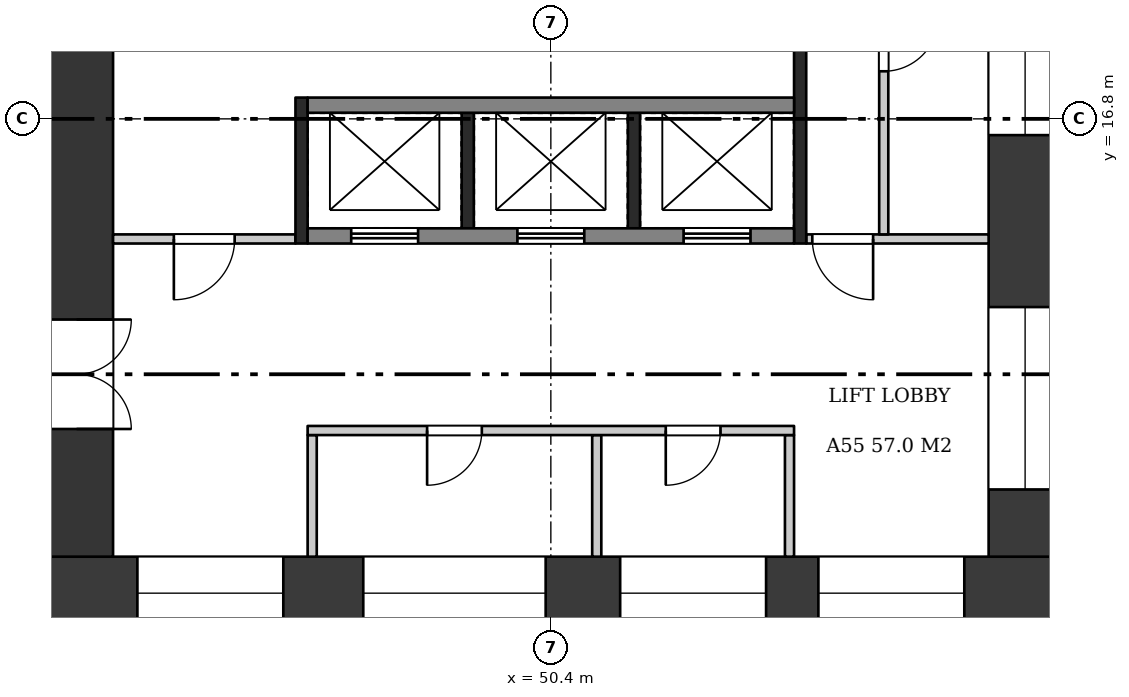
"""IFC4 building model, lengths in metres.
Left out: names, types, materials, properties, quantities, classifications, styles, units other than length and angle.
Written with IfcOpenShell. Run it as: python <this file> out.ifc"""

import sys

from ifc_helpers import new_model, si_unit, direction, frame, frame_2d, origin, place, context, subcontext, project, spatial, rectangle, extrude, element, fill, save


model = new_model("IFC4")
c1 = context("Model", 3, precision=1e-05, world=origin(), true_north=direction((0.0, 1.0)))
c2 = subcontext(c1, "Body", "Model", "MODEL_VIEW")
j1 = project(units=[si_unit("LENGTHUNIT", "METRE"), si_unit("PLANEANGLEUNIT", "RADIAN")], contexts=[c1])
p1 = place(None, origin())
s1 = spatial("IfcSite", under=j1, at=p1, CompositionType="ELEMENT")
p2 = place(p1, origin())
s2 = spatial("IfcBuilding", under=s1, at=p2, CompositionType="ELEMENT")
p3 = place(p2, frame((0.0, 0.0, 214.2)))
s3 = spatial("IfcBuildingStorey", under=s2, at=p3, CompositionType="ELEMENT", Elevation=214.2)
p4 = place(p3, frame((42.0, 9.0, 0.0), z_axis=(0.0, 0.0, 1.0), x_axis=(1.0, 0.0, 0.0)))
e1 = element("IfcWall", 1, at=p4, inside=s3, PredefinedType="SHEAR", context=c2, shape_type="SweptSolid", body=[
    extrude(rectangle(XDim=16.8, YDim=1.2, at=frame_2d((8.4, 0.0))), origin(), (0.0, 0.0, 1.0), 3.22),
])
p5 = place(p4, frame((1.6, 0.0, 0.6)))
e2 = element("IfcOpeningElement", 2, at=p5, cuts=e1, PredefinedType="OPENING", context=c2, shape_type="SweptSolid", body=[
    extrude(rectangle(XDim=2.4, YDim=2.1, at=frame_2d((1.2, 1.05))), frame((0.0, 0.61, 0.0), z_axis=(0.0, -1.0, 0.0), x_axis=(1.0, 0.0, 0.0)), (0.0, 0.0, 1.0), 1.22),
])
p6 = place(p4, frame((5.315, 0.0, 1.6)))
e3 = element("IfcOpeningElement", 3, at=p6, cuts=e1, PredefinedType="OPENING", context=c2, shape_type="SweptSolid", body=[
    extrude(rectangle(XDim=3.0, YDim=1.2, at=frame_2d((1.5, 0.6))), frame((0.0, 0.61, 0.0), z_axis=(0.0, -1.0, 0.0), x_axis=(1.0, 0.0, 0.0)), (0.0, 0.0, 1.0), 1.22),
])
p7 = place(p4, frame((9.54, 0.0, 1.6)))
e4 = element("IfcOpeningElement", 4, at=p7, cuts=e1, PredefinedType="OPENING", context=c2, shape_type="SweptSolid", body=[
    extrude(rectangle(XDim=2.4, YDim=1.2, at=frame_2d((1.2, 0.6))), frame((0.0, 0.61, 0.0), z_axis=(0.0, -1.0, 0.0), x_axis=(1.0, 0.0, 0.0)), (0.0, 0.0, 1.0), 1.22),
])
p8 = place(p4, frame((12.8, 0.0, 0.6)))
e5 = element("IfcOpeningElement", 5, at=p8, cuts=e1, PredefinedType="OPENING", context=c2, shape_type="SweptSolid", body=[
    extrude(rectangle(XDim=2.4, YDim=2.1, at=frame_2d((1.2, 1.05))), frame((0.0, 0.61, 0.0), z_axis=(0.0, -1.0, 0.0), x_axis=(1.0, 0.0, 0.0)), (0.0, 0.0, 1.0), 1.22),
])
p9 = place(p3, frame((42.6, 9.6, 0.0), z_axis=(0.0, 0.0, 1.0), x_axis=(0.0, 1.0, 0.0)))
e6 = element("IfcWall", 6, at=p9, inside=s3, PredefinedType="SHEAR", context=c2, shape_type="SweptSolid", body=[
    extrude(rectangle(XDim=14.4, YDim=1.2, at=frame_2d((7.2, 0.0))), origin(), (0.0, 0.0, 1.0), 3.22),
])
p10 = place(p9, frame((2.1, 0.0, 0.0)))
e7 = element("IfcOpeningElement", 7, at=p10, cuts=e6, PredefinedType="OPENING", context=c2, shape_type="SweptSolid", body=[
    extrude(rectangle(XDim=1.8, YDim=2.1, at=frame_2d((0.9, 1.05))), frame((0.0, 0.61, 0.0), z_axis=(0.0, -1.0, 0.0), x_axis=(1.0, 0.0, 0.0)), (0.0, 0.0, 1.0), 1.22),
])
p11 = place(p3, frame((58.2, 9.6, 0.0), z_axis=(0.0, 0.0, 1.0), x_axis=(0.0, 1.0, 0.0)))
e8 = element("IfcWall", 8, at=p11, inside=s3, PredefinedType="SHEAR", context=c2, shape_type="SweptSolid", body=[
    extrude(rectangle(XDim=14.4, YDim=1.2, at=frame_2d((7.2, 0.0))), origin(), (0.0, 0.0, 1.0), 3.22),
])
p12 = place(p11, frame((1.105, 0.0, 0.6)))
e9 = element("IfcOpeningElement", 9, at=p12, cuts=e8, PredefinedType="OPENING", context=c2, shape_type="SweptSolid", body=[
    extrude(rectangle(XDim=3.0, YDim=2.1, at=frame_2d((1.5, 1.05))), frame((0.0, 0.61, 0.0), z_axis=(0.0, -1.0, 0.0), x_axis=(1.0, 0.0, 0.0)), (0.0, 0.0, 1.0), 1.22),
])
p13 = place(p11, frame((6.933, 0.0, 1.6)))
e10 = element("IfcOpeningElement", 10, at=p13, cuts=e8, PredefinedType="OPENING", context=c2, shape_type="SweptSolid", body=[
    extrude(rectangle(XDim=3.0, YDim=1.2, at=frame_2d((1.5, 0.6))), frame((0.0, 0.61, 0.0), z_axis=(0.0, -1.0, 0.0), x_axis=(1.0, 0.0, 0.0)), (0.0, 0.0, 1.0), 1.22),
])
p14 = place(p11, frame((12.127, 0.0, 1.6)))
e11 = element("IfcOpeningElement", 11, at=p14, cuts=e8, PredefinedType="OPENING", context=c2, shape_type="SweptSolid", body=[
    extrude(rectangle(XDim=1.8, YDim=1.2, at=frame_2d((0.9, 0.6))), frame((0.0, 0.61, 0.0), z_axis=(0.0, -1.0, 0.0), x_axis=(1.0, 0.0, 0.0)), (0.0, 0.0, 1.0), 1.22),
])
for number, where, z_axis, x_axis in (
    (12, (46.475, 9.6, 0.0), (0.0, 0.0, 1.0), (0.0, 1.0, 0.0)),
    (13, (54.325, 9.6, 0.0), (0.0, 0.0, 1.0), (0.0, 1.0, 0.0)),
    (14, (51.155, 9.6, 0.0), (0.0, 0.0, 1.0), (0.0, 1.0, 0.0)),
):
    element("IfcWall", number, at=place(p3, frame(where, z_axis=z_axis, x_axis=x_axis)), inside=s3, PredefinedType="PARTITIONING", context=c2, shape_type="SweptSolid", body=[
        extrude(rectangle(XDim=2.0, YDim=0.15, at=frame_2d((1.0, 0.0))), origin(), (0.0, 0.0, 1.0), 3.22),
    ])
p15 = place(p3, frame((46.4, 11.675, 0.0), z_axis=(0.0, 0.0, 1.0), x_axis=(1.0, 0.0, 0.0)))
e15 = element("IfcWall", 15, at=p15, inside=s3, PredefinedType="PARTITIONING", context=c2, shape_type="SweptSolid", body=[
    extrude(rectangle(XDim=8.0, YDim=0.15, at=frame_2d((4.0, 0.0))), origin(), (0.0, 0.0, 1.0), 3.22),
])
p16 = place(p15, frame((1.965, 0.0, 0.0)))
e16 = element("IfcOpeningElement", 16, at=p16, cuts=e15, PredefinedType="OPENING", context=c2, shape_type="SweptSolid", body=[
    extrude(rectangle(XDim=0.9, YDim=2.1, at=frame_2d((0.45, 1.05))), frame((0.0, 0.085, 0.0), z_axis=(0.0, -1.0, 0.0), x_axis=(1.0, 0.0, 0.0)), (0.0, 0.0, 1.0), 0.17),
])
p17 = place(p15, frame((5.89, 0.0, 0.0)))
e17 = element("IfcOpeningElement", 17, at=p17, cuts=e15, PredefinedType="OPENING", context=c2, shape_type="SweptSolid", body=[
    extrude(rectangle(XDim=0.9, YDim=2.1, at=frame_2d((0.45, 1.05))), frame((0.0, 0.085, 0.0), z_axis=(0.0, -1.0, 0.0), x_axis=(1.0, 0.0, 0.0)), (0.0, 0.0, 1.0), 0.17),
])
for number, where, z_axis, x_axis in (
    (18, (49.033, 15.0, 0.0), (0.0, 0.0, 1.0), (0.0, 1.0, 0.0)),
    (19, (51.767, 15.0, 0.0), (0.0, 0.0, 1.0), (0.0, 1.0, 0.0)),
):
    element("IfcWall", number, at=place(p3, frame(where, z_axis=z_axis, x_axis=x_axis)), inside=s3, PredefinedType="SHEAR", context=c2, shape_type="SweptSolid", body=[
        extrude(rectangle(XDim=1.9, YDim=0.2, at=frame_2d((0.95, 0.0))), origin(), (0.0, 0.0, 1.0), 3.22),
    ])
p18 = place(p3, frame((46.4, 14.875, 0.0), z_axis=(0.0, 0.0, 1.0), x_axis=(1.0, 0.0, 0.0)))
e20 = element("IfcWall", 20, at=p18, inside=s3, PredefinedType="SHEAR", context=c2, shape_type="SweptSolid", body=[
    extrude(rectangle(XDim=8.0, YDim=0.25, at=frame_2d((4.0, 0.0))), origin(), (0.0, 0.0, 1.0), 3.22),
])
p19 = place(p18, frame((0.717, 0.0, 0.0)))
e21 = element("IfcOpeningElement", 21, at=p19, cuts=e20, PredefinedType="OPENING", context=c2, shape_type="SweptSolid", body=[
    extrude(rectangle(XDim=1.1, YDim=2.1, at=frame_2d((0.55, 1.05))), frame((0.0, 0.135, 0.0), z_axis=(0.0, -1.0, 0.0), x_axis=(1.0, 0.0, 0.0)), (0.0, 0.0, 1.0), 0.27),
])
p20 = place(p18, frame((3.45, 0.0, 0.0)))
e22 = element("IfcOpeningElement", 22, at=p20, cuts=e20, PredefinedType="OPENING", context=c2, shape_type="SweptSolid", body=[
    extrude(rectangle(XDim=1.1, YDim=2.1, at=frame_2d((0.55, 1.05))), frame((0.0, 0.135, 0.0), z_axis=(0.0, -1.0, 0.0), x_axis=(1.0, 0.0, 0.0)), (0.0, 0.0, 1.0), 0.27),
])
p21 = place(p18, frame((6.183, 0.0, 0.0)))
e23 = element("IfcOpeningElement", 23, at=p21, cuts=e20, PredefinedType="OPENING", context=c2, shape_type="SweptSolid", body=[
    extrude(rectangle(XDim=1.1, YDim=2.1, at=frame_2d((0.55, 1.05))), frame((0.0, 0.135, 0.0), z_axis=(0.0, -1.0, 0.0), x_axis=(1.0, 0.0, 0.0)), (0.0, 0.0, 1.0), 0.27),
])
p22 = place(p3, frame((46.4, 17.025, 0.0), z_axis=(0.0, 0.0, 1.0), x_axis=(1.0, 0.0, 0.0)))
e24 = element("IfcWall", 24, at=p22, inside=s3, PredefinedType="SHEAR", context=c2, shape_type="SweptSolid", body=[
    extrude(rectangle(XDim=8.0, YDim=0.25, at=frame_2d((4.0, 0.0))), origin(), (0.0, 0.0, 1.0), 3.22),
])
p23 = place(p3, frame((46.3, 14.75, 0.0), z_axis=(0.0, 0.0, 1.0), x_axis=(0.0, 1.0, 0.0)))
e25 = element("IfcWall", 25, at=p23, inside=s3, PredefinedType="SHEAR", context=c2, shape_type="SweptSolid", body=[
    extrude(rectangle(XDim=2.4, YDim=0.2, at=frame_2d((1.2, 0.0))), origin(), (0.0, 0.0, 1.0), 3.22),
])
p24 = place(p3, frame((43.2, 14.825, 0.0), z_axis=(0.0, 0.0, 1.0), x_axis=(1.0, 0.0, 0.0)))
e26 = element("IfcWall", 26, at=p24, inside=s3, PredefinedType="PARTITIONING", context=c2, shape_type="SweptSolid", body=[
    extrude(rectangle(XDim=3.0, YDim=0.15, at=frame_2d((1.5, 0.0))), origin(), (0.0, 0.0, 1.0), 3.22),
])
p25 = place(p24, frame((1.0, 0.0, 0.0)))
e27 = element("IfcOpeningElement", 27, at=p25, cuts=e26, PredefinedType="OPENING", context=c2, shape_type="SweptSolid", body=[
    extrude(rectangle(XDim=1.0, YDim=2.1, at=frame_2d((0.5, 1.05))), frame((0.0, 0.085, 0.0), z_axis=(0.0, -1.0, 0.0), x_axis=(1.0, 0.0, 0.0)), (0.0, 0.0, 1.0), 0.17),
])
p26 = place(p3, frame((54.5, 14.75, 0.0), z_axis=(0.0, 0.0, 1.0), x_axis=(0.0, 1.0, 0.0)))
e28 = element("IfcWall", 28, at=p26, inside=s3, PredefinedType="SHEAR", context=c2, shape_type="SweptSolid", body=[
    extrude(rectangle(XDim=9.25, YDim=0.2, at=frame_2d((4.625, 0.0))), origin(), (0.0, 0.0, 1.0), 3.22),
])
p27 = place(p3, frame((54.6, 14.825, 0.0), z_axis=(0.0, 0.0, 1.0), x_axis=(1.0, 0.0, 0.0)))
e29 = element("IfcWall", 29, at=p27, inside=s3, PredefinedType="PARTITIONING", context=c2, shape_type="SweptSolid", body=[
    extrude(rectangle(XDim=3.0, YDim=0.15, at=frame_2d((1.5, 0.0))), origin(), (0.0, 0.0, 1.0), 3.22),
])
p28 = place(p27, frame((0.1, 0.0, 0.0)))
e30 = element("IfcOpeningElement", 30, at=p28, cuts=e29, PredefinedType="OPENING", context=c2, shape_type="SweptSolid", body=[
    extrude(rectangle(XDim=1.0, YDim=2.1, at=frame_2d((0.5, 1.05))), frame((0.0, 0.085, 0.0), z_axis=(0.0, -1.0, 0.0), x_axis=(1.0, 0.0, 0.0)), (0.0, 0.0, 1.0), 0.17),
])
p29 = place(p3, frame((55.875, 14.9, 0.0), z_axis=(0.0, 0.0, 1.0), x_axis=(0.0, 1.0, 0.0)))
e31 = element("IfcWall", 31, at=p29, inside=s3, PredefinedType="PARTITIONING", context=c2, shape_type="SweptSolid", body=[
    extrude(rectangle(XDim=9.1, YDim=0.15, at=frame_2d((4.55, 0.0))), origin(), (0.0, 0.0, 1.0), 3.22),
])
p30 = place(p29, frame((2.683, 0.0, 0.0)))
e32 = element("IfcOpeningElement", 32, at=p30, cuts=e31, PredefinedType="OPENING", context=c2, shape_type="SweptSolid", body=[
    extrude(rectangle(XDim=0.9, YDim=2.1, at=frame_2d((0.45, 1.05))), frame((0.0, 0.085, 0.0), z_axis=(0.0, -1.0, 0.0), x_axis=(1.0, 0.0, 0.0)), (0.0, 0.0, 1.0), 0.17),
])
p31 = place(p29, frame((7.308, 0.0, 0.0)))
e33 = element("IfcOpeningElement", 33, at=p31, cuts=e31, PredefinedType="OPENING", context=c2, shape_type="SweptSolid", body=[
    extrude(rectangle(XDim=0.9, YDim=2.1, at=frame_2d((0.45, 1.05))), frame((0.0, 0.085, 0.0), z_axis=(0.0, -1.0, 0.0), x_axis=(1.0, 0.0, 0.0)), (0.0, 0.0, 1.0), 0.17),
])
p32 = place(p10, frame((1.8, 0.0, 0.0), z_axis=(0.0, 0.0, 1.0), x_axis=(-1.0, 0.0, 0.0)))
e34 = element("IfcDoor", 34, at=p32, inside=s3, OperationType="DOUBLE_DOOR_SINGLE_SWING", PredefinedType="DOOR", context=c2, shape_type="SweptSolid", body=[
    extrude(rectangle(XDim=1.8, YDim=2.1, at=frame_2d((0.9, 1.05))), frame((0.0, 0.025, 0.0), z_axis=(0.0, -1.0, 0.0), x_axis=(1.0, 0.0, 0.0)), (0.0, 0.0, 1.0), 0.05),
])
fill(e7, e34)
p33 = place(p16, frame((0.9, 0.0, 0.0), z_axis=(0.0, 0.0, 1.0), x_axis=(-1.0, 0.0, 0.0)))
e35 = element("IfcDoor", 35, at=p33, inside=s3, OperationType="SINGLE_SWING_RIGHT", PredefinedType="DOOR", context=c2, shape_type="SweptSolid", body=[
    extrude(rectangle(XDim=0.9, YDim=2.1, at=frame_2d((0.45, 1.05))), frame((0.0, 0.025, 0.0), z_axis=(0.0, -1.0, 0.0), x_axis=(1.0, 0.0, 0.0)), (0.0, 0.0, 1.0), 0.05),
])
fill(e16, e35)
p34 = place(p17, frame((0.9, 0.0, 0.0), z_axis=(0.0, 0.0, 1.0), x_axis=(-1.0, 0.0, 0.0)))
e36 = element("IfcDoor", 36, at=p34, inside=s3, OperationType="SINGLE_SWING_RIGHT", PredefinedType="DOOR", context=c2, shape_type="SweptSolid", body=[
    extrude(rectangle(XDim=0.9, YDim=2.1, at=frame_2d((0.45, 1.05))), frame((0.0, 0.025, 0.0), z_axis=(0.0, -1.0, 0.0), x_axis=(1.0, 0.0, 0.0)), (0.0, 0.0, 1.0), 0.05),
])
fill(e17, e36)
p35 = place(p19, origin())
e37 = element("IfcDoor", 37, at=p35, inside=s3, OperationType="DOUBLE_DOOR_SLIDING", PredefinedType="DOOR", context=c2, shape_type="SweptSolid", body=[
    extrude(rectangle(XDim=1.1, YDim=2.1, at=frame_2d((0.55, 1.05))), frame((0.0, 0.025, 0.0), z_axis=(0.0, -1.0, 0.0), x_axis=(1.0, 0.0, 0.0)), (0.0, 0.0, 1.0), 0.05),
])
fill(e21, e37)
p36 = place(p20, origin())
e38 = element("IfcDoor", 38, at=p36, inside=s3, OperationType="DOUBLE_DOOR_SLIDING", PredefinedType="DOOR", context=c2, shape_type="SweptSolid", body=[
    extrude(rectangle(XDim=1.1, YDim=2.1, at=frame_2d((0.55, 1.05))), frame((0.0, 0.025, 0.0), z_axis=(0.0, -1.0, 0.0), x_axis=(1.0, 0.0, 0.0)), (0.0, 0.0, 1.0), 0.05),
])
fill(e22, e38)
p37 = place(p21, origin())
e39 = element("IfcDoor", 39, at=p37, inside=s3, OperationType="DOUBLE_DOOR_SLIDING", PredefinedType="DOOR", context=c2, shape_type="SweptSolid", body=[
    extrude(rectangle(XDim=1.1, YDim=2.1, at=frame_2d((0.55, 1.05))), frame((0.0, 0.025, 0.0), z_axis=(0.0, -1.0, 0.0), x_axis=(1.0, 0.0, 0.0)), (0.0, 0.0, 1.0), 0.05),
])
fill(e23, e39)
p38 = place(p25, frame((1.0, 0.0, 0.0), z_axis=(0.0, 0.0, 1.0), x_axis=(-1.0, 0.0, 0.0)))
e40 = element("IfcDoor", 40, at=p38, inside=s3, OperationType="SINGLE_SWING_RIGHT", PredefinedType="DOOR", context=c2, shape_type="SweptSolid", body=[
    extrude(rectangle(XDim=1.0, YDim=2.1, at=frame_2d((0.5, 1.05))), frame((0.0, 0.025, 0.0), z_axis=(0.0, -1.0, 0.0), x_axis=(1.0, 0.0, 0.0)), (0.0, 0.0, 1.0), 0.05),
])
fill(e27, e40)
p39 = place(p28, frame((1.0, 0.0, 0.0), z_axis=(0.0, 0.0, 1.0), x_axis=(-1.0, 0.0, 0.0)))
e41 = element("IfcDoor", 41, at=p39, inside=s3, OperationType="SINGLE_SWING_LEFT", PredefinedType="DOOR", context=c2, shape_type="SweptSolid", body=[
    extrude(rectangle(XDim=1.0, YDim=2.1, at=frame_2d((0.5, 1.05))), frame((0.0, 0.025, 0.0), z_axis=(0.0, -1.0, 0.0), x_axis=(1.0, 0.0, 0.0)), (0.0, 0.0, 1.0), 0.05),
])
fill(e30, e41)
p40 = place(p30, frame((0.9, 0.0, 0.0), z_axis=(0.0, 0.0, 1.0), x_axis=(-1.0, 0.0, 0.0)))
e42 = element("IfcDoor", 42, at=p40, inside=s3, OperationType="SINGLE_SWING_LEFT", PredefinedType="DOOR", context=c2, shape_type="SweptSolid", body=[
    extrude(rectangle(XDim=0.9, YDim=2.1, at=frame_2d((0.45, 1.05))), frame((0.0, 0.025, 0.0), z_axis=(0.0, -1.0, 0.0), x_axis=(1.0, 0.0, 0.0)), (0.0, 0.0, 1.0), 0.05),
])
fill(e32, e42)
p41 = place(p5, origin())
e43 = element("IfcWindow", 43, at=p41, inside=s3, PartitioningType="SINGLE_PANEL", PredefinedType="WINDOW", context=c2, shape_type="SweptSolid", body=[
    extrude(rectangle(XDim=2.4, YDim=2.1, at=frame_2d((1.2, 1.05))), frame((0.0, 0.03, 0.0), z_axis=(0.0, -1.0, 0.0), x_axis=(1.0, 0.0, 0.0)), (0.0, 0.0, 1.0), 0.06),
])
fill(e2, e43)
p42 = place(p6, origin())
e44 = element("IfcWindow", 44, at=p42, inside=s3, PartitioningType="SINGLE_PANEL", PredefinedType="WINDOW", context=c2, shape_type="SweptSolid", body=[
    extrude(rectangle(XDim=3.0, YDim=1.2, at=frame_2d((1.5, 0.6))), frame((0.0, 0.03, 0.0), z_axis=(0.0, -1.0, 0.0), x_axis=(1.0, 0.0, 0.0)), (0.0, 0.0, 1.0), 0.06),
])
fill(e3, e44)
p43 = place(p7, origin())
e45 = element("IfcWindow", 45, at=p43, inside=s3, PartitioningType="SINGLE_PANEL", PredefinedType="WINDOW", context=c2, shape_type="SweptSolid", body=[
    extrude(rectangle(XDim=2.4, YDim=1.2, at=frame_2d((1.2, 0.6))), frame((0.0, 0.03, 0.0), z_axis=(0.0, -1.0, 0.0), x_axis=(1.0, 0.0, 0.0)), (0.0, 0.0, 1.0), 0.06),
])
fill(e4, e45)
p44 = place(p8, origin())
e46 = element("IfcWindow", 46, at=p44, inside=s3, PartitioningType="SINGLE_PANEL", PredefinedType="WINDOW", context=c2, shape_type="SweptSolid", body=[
    extrude(rectangle(XDim=2.4, YDim=2.1, at=frame_2d((1.2, 1.05))), frame((0.0, 0.03, 0.0), z_axis=(0.0, -1.0, 0.0), x_axis=(1.0, 0.0, 0.0)), (0.0, 0.0, 1.0), 0.06),
])
fill(e5, e46)
p45 = place(p12, origin())
e47 = element("IfcWindow", 47, at=p45, inside=s3, PartitioningType="SINGLE_PANEL", PredefinedType="WINDOW", context=c2, shape_type="SweptSolid", body=[
    extrude(rectangle(XDim=3.0, YDim=2.1, at=frame_2d((1.5, 1.05))), frame((0.0, 0.03, 0.0), z_axis=(0.0, -1.0, 0.0), x_axis=(1.0, 0.0, 0.0)), (0.0, 0.0, 1.0), 0.06),
])
fill(e9, e47)
p46 = place(p13, origin())
e48 = element("IfcWindow", 48, at=p46, inside=s3, PartitioningType="SINGLE_PANEL", PredefinedType="WINDOW", context=c2, shape_type="SweptSolid", body=[
    extrude(rectangle(XDim=3.0, YDim=1.2, at=frame_2d((1.5, 0.6))), frame((0.0, 0.03, 0.0), z_axis=(0.0, -1.0, 0.0), x_axis=(1.0, 0.0, 0.0)), (0.0, 0.0, 1.0), 0.06),
])
fill(e10, e48)
save(model, sys.argv[1])
